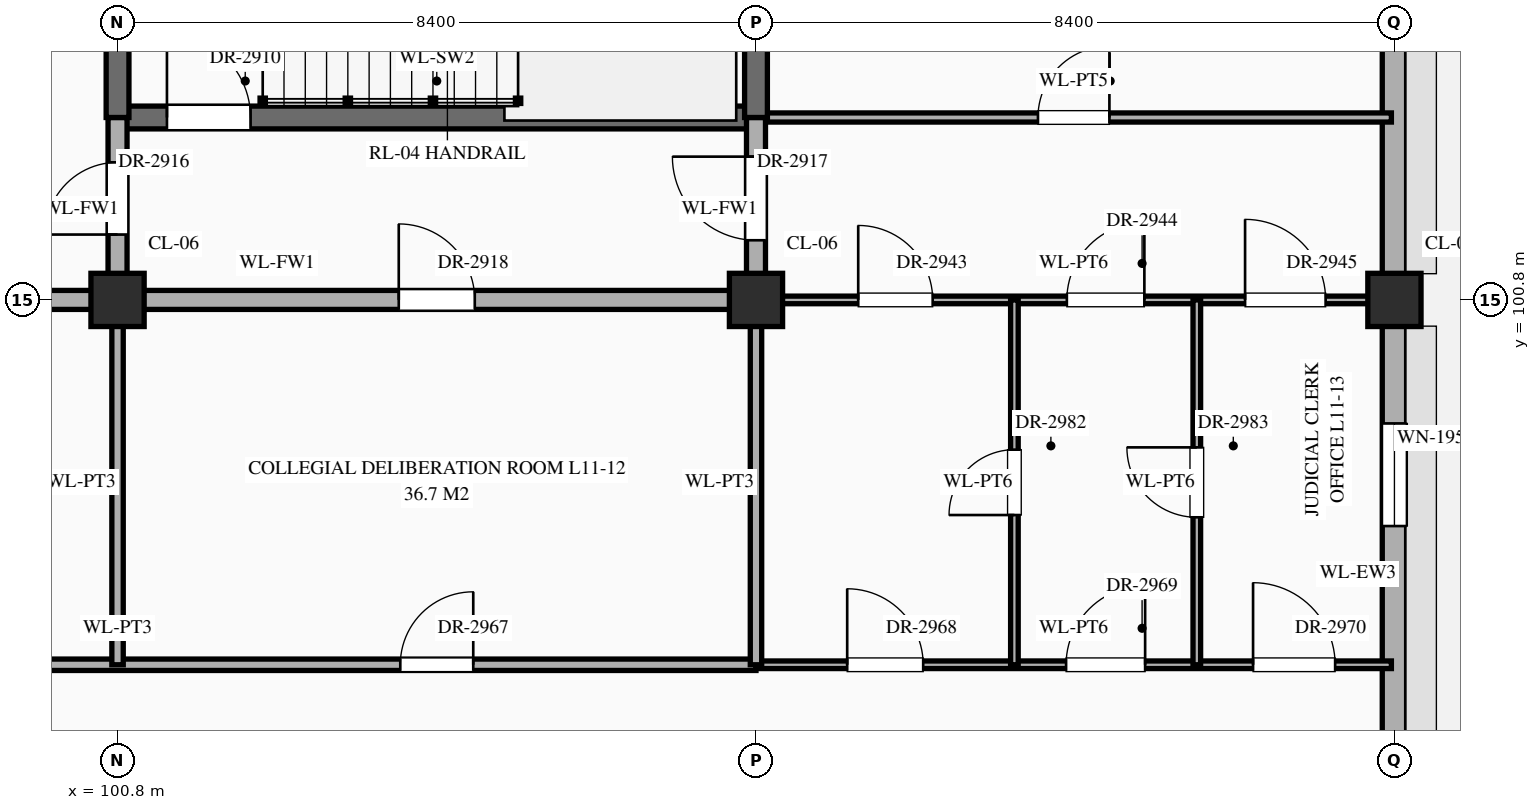
"""IFC4 building model, lengths in metres.
Left out: names, types, materials, properties, quantities, classifications, styles, units other than length and angle.
Written with IfcOpenShell. Run it as: python <this file> out.ifc"""

import sys

from ifc_helpers import new_model, si_unit, direction, frame, frame_2d, origin, origin_2d, place, context, subcontext, project, spatial, rectangle, extrude, element, fill, save


model = new_model("IFC4")
c1 = context("Model", 3, precision=1e-05, world=origin(), true_north=direction((0.0, 1.0)))
c2 = subcontext(c1, "Body", "Model", "MODEL_VIEW")
j1 = project(units=[si_unit("LENGTHUNIT", "METRE"), si_unit("PLANEANGLEUNIT", "RADIAN")], contexts=[c1])
p1 = place(None, origin())
s1 = spatial("IfcSite", under=j1, at=p1, CompositionType="ELEMENT")
p2 = place(p1, origin())
s2 = spatial("IfcBuilding", under=s1, at=p2, CompositionType="ELEMENT")
p3 = place(p2, frame((0.0, 0.0, 47.7)))
s3 = spatial("IfcBuildingStorey", under=s2, at=p3, CompositionType="ELEMENT", Elevation=47.7)
for number, where, z_axis, x_axis in (
    (1, (100.8, 100.8, 0.0), (0.0, 0.0, 1.0), (1.0, 0.0, 0.0)),
    (2, (109.2, 100.8, 0.0), (0.0, 0.0, 1.0), (1.0, 0.0, 0.0)),
    (3, (117.6, 100.8, 0.0), (0.0, 0.0, 1.0), (1.0, 0.0, 0.0)),
):
    element("IfcColumn", number, at=place(p3, frame(where, z_axis=z_axis, x_axis=x_axis)), inside=s3, PredefinedType="COLUMN", context=c2, shape_type="SweptSolid", body=[
        extrude(rectangle(XDim=0.7, YDim=0.7, at=origin_2d()), origin(), (0.0, 0.0, 1.0), 4.2),
    ])
p4 = place(p3, frame((117.6, 93.945, 0.0), z_axis=(0.0, 0.0, 1.0), x_axis=(0.0, 1.0, 0.0)))
e4 = element("IfcWall", 4, at=p4, inside=s3, PredefinedType="STANDARD", context=c2, shape_type="SweptSolid", body=[
    extrude(rectangle(XDim=6.51, YDim=0.32, at=frame_2d((3.255, 0.0))), origin(), (0.0, 0.0, 1.0), 3.31),
])
p5 = place(p4, frame((3.88, 0.0, 0.55)))
e5 = element("IfcOpeningElement", 5, at=p5, cuts=e4, PredefinedType="OPENING", context=c2, shape_type="SweptSolid", body=[
    extrude(rectangle(XDim=1.35, YDim=1.92, at=frame_2d((0.675, 0.96))), frame((0.0, 0.172, 0.0), z_axis=(0.0, -1.0, 0.0), x_axis=(1.0, 0.0, 0.0)), (0.0, 0.0, 1.0), 0.344),
])
p6 = place(p3, frame((117.6, 101.145, 0.0), z_axis=(0.0, 0.0, 1.0), x_axis=(0.0, 1.0, 0.0)))
e6 = element("IfcWall", 6, at=p6, inside=s3, PredefinedType="STANDARD", context=c2, shape_type="SweptSolid", body=[
    extrude(rectangle(XDim=6.51, YDim=0.32, at=frame_2d((3.255, 0.0))), origin(), (0.0, 0.0, 1.0), 3.31),
])
p7 = place(p6, frame((3.88, 0.0, 0.55)))
e7 = element("IfcOpeningElement", 7, at=p7, cuts=e6, PredefinedType="OPENING", context=c2, shape_type="SweptSolid", body=[
    extrude(rectangle(XDim=1.35, YDim=2.12, at=frame_2d((0.675, 1.06))), frame((0.0, 0.172, 0.0), z_axis=(0.0, -1.0, 0.0), x_axis=(1.0, 0.0, 0.0)), (0.0, 0.0, 1.0), 0.344),
])
p8 = place(p3, frame((92.4, 96.0, 0.0), z_axis=(0.0, 0.0, 1.0), x_axis=(1.0, 0.0, 0.0)))
e8 = element("IfcWall", 8, at=p8, inside=s3, PredefinedType="STANDARD", context=c2, shape_type="SweptSolid", body=[
    extrude(rectangle(XDim=16.8, YDim=0.15, at=frame_2d((8.4, 0.0))), origin(), (0.0, 0.0, 1.0), 3.96),
])
p9 = place(p8, frame((3.74, 0.0, 0.0)))
e9 = element("IfcOpeningElement", 9, at=p9, cuts=e8, PredefinedType="OPENING", context=c2, shape_type="SweptSolid", body=[
    extrude(rectangle(XDim=0.92, YDim=2.15, at=frame_2d((0.46, 1.075))), frame((0.0, 0.087, 0.0), z_axis=(0.0, -1.0, 0.0), x_axis=(1.0, 0.0, 0.0)), (0.0, 0.0, 1.0), 0.174),
])
p10 = place(p8, frame((12.12, 0.0, 0.0)))
e10 = element("IfcOpeningElement", 10, at=p10, cuts=e8, PredefinedType="OPENING", context=c2, shape_type="SweptSolid", body=[
    extrude(rectangle(XDim=0.96, YDim=2.2, at=frame_2d((0.48, 1.1))), frame((0.0, 0.087, 0.0), z_axis=(0.0, -1.0, 0.0), x_axis=(1.0, 0.0, 0.0)), (0.0, 0.0, 1.0), 0.174),
])
p11 = place(p3, frame((109.2, 96.0, 0.0), z_axis=(0.0, 0.0, 1.0), x_axis=(1.0, 0.0, 0.0)))
e11 = element("IfcWall", 11, at=p11, inside=s3, PredefinedType="STANDARD", context=c2, shape_type="SweptSolid", body=[
    extrude(rectangle(XDim=8.36, YDim=0.1, at=frame_2d((4.18, 0.0))), origin(), (0.0, 0.0, 1.0), 3.96),
])
p12 = place(p11, frame((1.2, 0.0, 0.0)))
e12 = element("IfcOpeningElement", 12, at=p12, cuts=e11, PredefinedType="OPENING", context=c2, shape_type="SweptSolid", body=[
    extrude(rectangle(XDim=1.0, YDim=2.25, at=frame_2d((0.5, 1.125))), frame((0.0, 0.062, 0.0), z_axis=(0.0, -1.0, 0.0), x_axis=(1.0, 0.0, 0.0)), (0.0, 0.0, 1.0), 0.124),
])
p13 = place(p11, frame((4.08, 0.0, 0.0)))
e13 = element("IfcOpeningElement", 13, at=p13, cuts=e11, PredefinedType="OPENING", context=c2, shape_type="SweptSolid", body=[
    extrude(rectangle(XDim=1.04, YDim=2.2, at=frame_2d((0.52, 1.1))), frame((0.0, 0.062, 0.0), z_axis=(0.0, -1.0, 0.0), x_axis=(1.0, 0.0, 0.0)), (0.0, 0.0, 1.0), 0.124),
])
p14 = place(p11, frame((6.54, 0.0, 0.0)))
e14 = element("IfcOpeningElement", 14, at=p14, cuts=e11, PredefinedType="OPENING", context=c2, shape_type="SweptSolid", body=[
    extrude(rectangle(XDim=1.08, YDim=2.25, at=frame_2d((0.54, 1.125))), frame((0.0, 0.062, 0.0), z_axis=(0.0, -1.0, 0.0), x_axis=(1.0, 0.0, 0.0)), (0.0, 0.0, 1.0), 0.124),
])
p15 = place(p3, frame((96.6, 100.8, 0.0), z_axis=(0.0, 0.0, 1.0), x_axis=(1.0, 0.0, 0.0)))
e15 = element("IfcWall", 15, at=p15, inside=s3, PredefinedType="STANDARD", context=c2, shape_type="SweptSolid", body=[
    extrude(rectangle(XDim=12.6, YDim=0.25, at=frame_2d((6.3, 0.0))), origin(), (0.0, 0.0, 1.0), 3.11),
])
p16 = place(p15, frame((7.9, 0.0, 0.0)))
e16 = element("IfcOpeningElement", 16, at=p16, cuts=e15, PredefinedType="OPENING", context=c2, shape_type="SweptSolid", body=[
    extrude(rectangle(XDim=1.0, YDim=2.2, at=frame_2d((0.5, 1.1))), frame((0.0, 0.137, 0.0), z_axis=(0.0, -1.0, 0.0), x_axis=(1.0, 0.0, 0.0)), (0.0, 0.0, 1.0), 0.274),
])
p17 = place(p3, frame((109.2, 100.8, 0.0), z_axis=(0.0, 0.0, 1.0), x_axis=(1.0, 0.0, 0.0)))
e17 = element("IfcWall", 17, at=p17, inside=s3, PredefinedType="STANDARD", context=c2, shape_type="SweptSolid", body=[
    extrude(rectangle(XDim=8.36, YDim=0.1, at=frame_2d((4.18, 0.0))), origin(), (0.0, 0.0, 1.0), 3.11),
])
p18 = place(p17, frame((1.345, 0.0, 0.0)))
e18 = element("IfcOpeningElement", 18, at=p18, cuts=e17, PredefinedType="OPENING", context=c2, shape_type="SweptSolid", body=[
    extrude(rectangle(XDim=0.98, YDim=2.35, at=frame_2d((0.49, 1.175))), frame((0.0, 0.062, 0.0), z_axis=(0.0, -1.0, 0.0), x_axis=(1.0, 0.0, 0.0)), (0.0, 0.0, 1.0), 0.124),
])
p19 = place(p17, frame((4.09, 0.0, 0.0)))
e19 = element("IfcOpeningElement", 19, at=p19, cuts=e17, PredefinedType="OPENING", context=c2, shape_type="SweptSolid", body=[
    extrude(rectangle(XDim=1.02, YDim=2.4, at=frame_2d((0.51, 1.2))), frame((0.0, 0.062, 0.0), z_axis=(0.0, -1.0, 0.0), x_axis=(1.0, 0.0, 0.0)), (0.0, 0.0, 1.0), 0.124),
])
p20 = place(p17, frame((6.435, 0.0, 0.0)))
e20 = element("IfcOpeningElement", 20, at=p20, cuts=e17, PredefinedType="OPENING", context=c2, shape_type="SweptSolid", body=[
    extrude(rectangle(XDim=1.06, YDim=2.4, at=frame_2d((0.53, 1.2))), frame((0.0, 0.062, 0.0), z_axis=(0.0, -1.0, 0.0), x_axis=(1.0, 0.0, 0.0)), (0.0, 0.0, 1.0), 0.124),
])
p21 = place(p3, frame((100.8, 103.2, 0.0), z_axis=(0.0, 0.0, 1.0), x_axis=(1.0, 0.0, 0.0)))
e21 = element("IfcWall", 21, at=p21, inside=s3, PredefinedType="SHEAR", context=c2, shape_type="SweptSolid", body=[
    extrude(rectangle(XDim=8.4, YDim=0.3, at=frame_2d((4.2, 0.0))), origin(), (0.0, 0.0, 1.0), 3.96),
])
p22 = place(p21, frame((0.65, 0.0, 0.0)))
e22 = element("IfcOpeningElement", 22, at=p22, cuts=e21, PredefinedType="OPENING", context=c2, shape_type="SweptSolid", body=[
    extrude(rectangle(XDim=1.1, YDim=2.2, at=frame_2d((0.55, 1.1))), frame((0.0, 0.162, 0.0), z_axis=(0.0, -1.0, 0.0), x_axis=(1.0, 0.0, 0.0)), (0.0, 0.0, 1.0), 0.324),
])
p23 = place(p3, frame((109.2, 103.2, 0.0), z_axis=(0.0, 0.0, 1.0), x_axis=(1.0, 0.0, 0.0)))
e23 = element("IfcWall", 23, at=p23, inside=s3, PredefinedType="STANDARD", context=c2, shape_type="SweptSolid", body=[
    extrude(rectangle(XDim=8.36, YDim=0.12, at=frame_2d((4.18, 0.0))), origin(), (0.0, 0.0, 1.0), 3.96),
])
p24 = place(p23, frame((3.71, 0.0, 0.0)))
e24 = element("IfcOpeningElement", 24, at=p24, cuts=e23, PredefinedType="OPENING", context=c2, shape_type="SweptSolid", body=[
    extrude(rectangle(XDim=0.94, YDim=2.3, at=frame_2d((0.47, 1.15))), frame((0.0, 0.072, 0.0), z_axis=(0.0, -1.0, 0.0), x_axis=(1.0, 0.0, 0.0)), (0.0, 0.0, 1.0), 0.144),
])
p25 = place(p3, frame((100.8, 96.0, 0.0), z_axis=(0.0, 0.0, 1.0), x_axis=(0.0, 1.0, 0.0)))
e25 = element("IfcWall", 25, at=p25, inside=s3, PredefinedType="STANDARD", context=c2, shape_type="SweptSolid", body=[
    extrude(rectangle(XDim=4.8, YDim=0.15, at=frame_2d((2.4, 0.0))), origin(), (0.0, 0.0, 1.0), 3.21),
])
p26 = place(p3, frame((100.8, 100.8, 0.0), z_axis=(0.0, 0.0, 1.0), x_axis=(0.0, 1.0, 0.0)))
e26 = element("IfcWall", 26, at=p26, inside=s3, PredefinedType="STANDARD", context=c2, shape_type="SweptSolid", body=[
    extrude(rectangle(XDim=2.4, YDim=0.25, at=frame_2d((1.2, 0.0))), origin(), (0.0, 0.0, 1.0), 3.21),
])
p27 = place(p26, frame((0.86, 0.0, 0.0)))
e27 = element("IfcOpeningElement", 27, at=p27, cuts=e26, PredefinedType="OPENING", context=c2, shape_type="SweptSolid", body=[
    extrude(rectangle(XDim=0.95, YDim=2.15, at=frame_2d((0.475, 1.075))), frame((0.0, 0.137, 0.0), z_axis=(0.0, -1.0, 0.0), x_axis=(1.0, 0.0, 0.0)), (0.0, 0.0, 1.0), 0.274),
])
p28 = place(p3, frame((100.8, 103.2, 0.0), z_axis=(0.0, 0.0, 1.0), x_axis=(0.0, 1.0, 0.0)))
e28 = element("IfcWall", 28, at=p28, inside=s3, PredefinedType="SHEAR", context=c2, shape_type="SweptSolid", body=[
    extrude(rectangle(XDim=1.2, YDim=0.3, at=frame_2d((0.6, 0.0))), origin(), (0.0, 0.0, 1.0), 3.96),
])
p29 = place(p3, frame((109.2, 96.0, 0.0), z_axis=(0.0, 0.0, 1.0), x_axis=(0.0, 1.0, 0.0)))
e29 = element("IfcWall", 29, at=p29, inside=s3, PredefinedType="STANDARD", context=c2, shape_type="SweptSolid", body=[
    extrude(rectangle(XDim=4.8, YDim=0.15, at=frame_2d((2.4, 0.0))), origin(), (0.0, 0.0, 1.0), 3.21),
])
p30 = place(p3, frame((109.2, 100.8, 0.0), z_axis=(0.0, 0.0, 1.0), x_axis=(0.0, 1.0, 0.0)))
e30 = element("IfcWall", 30, at=p30, inside=s3, PredefinedType="STANDARD", context=c2, shape_type="SweptSolid", body=[
    extrude(rectangle(XDim=2.4, YDim=0.25, at=frame_2d((1.2, 0.0))), origin(), (0.0, 0.0, 1.0), 3.21),
])
p31 = place(p30, frame((0.785, 0.0, 0.0)))
e31 = element("IfcOpeningElement", 31, at=p31, cuts=e30, PredefinedType="OPENING", context=c2, shape_type="SweptSolid", body=[
    extrude(rectangle(XDim=1.1, YDim=2.2, at=frame_2d((0.55, 1.1))), frame((0.0, 0.137, 0.0), z_axis=(0.0, -1.0, 0.0), x_axis=(1.0, 0.0, 0.0)), (0.0, 0.0, 1.0), 0.274),
])
p32 = place(p3, frame((109.2, 103.2, 0.0), z_axis=(0.0, 0.0, 1.0), x_axis=(0.0, 1.0, 0.0)))
e32 = element("IfcWall", 32, at=p32, inside=s3, PredefinedType="SHEAR", context=c2, shape_type="SweptSolid", body=[
    extrude(rectangle(XDim=4.76, YDim=0.3, at=frame_2d((2.38, 0.0))), origin(), (0.0, 0.0, 1.0), 3.96),
])
p33 = place(p3, frame((112.6, 96.0, 0.0), z_axis=(0.0, 0.0, 1.0), x_axis=(0.0, 1.0, 0.0)))
e33 = element("IfcWall", 33, at=p33, inside=s3, PredefinedType="STANDARD", context=c2, shape_type="SweptSolid", body=[
    extrude(rectangle(XDim=4.8, YDim=0.1, at=frame_2d((2.4, 0.0))), origin(), (0.0, 0.0, 1.0), 3.96),
])
p34 = place(p33, frame((1.97, 0.0, 0.0)))
e34 = element("IfcOpeningElement", 34, at=p34, cuts=e33, PredefinedType="OPENING", context=c2, shape_type="SweptSolid", body=[
    extrude(rectangle(XDim=0.86, YDim=2.1, at=frame_2d((0.43, 1.05))), frame((0.0, 0.062, 0.0), z_axis=(0.0, -1.0, 0.0), x_axis=(1.0, 0.0, 0.0)), (0.0, 0.0, 1.0), 0.124),
])
p35 = place(p3, frame((115.0, 96.0, 0.0), z_axis=(0.0, 0.0, 1.0), x_axis=(0.0, 1.0, 0.0)))
e35 = element("IfcWall", 35, at=p35, inside=s3, PredefinedType="STANDARD", context=c2, shape_type="SweptSolid", body=[
    extrude(rectangle(XDim=4.8, YDim=0.1, at=frame_2d((2.4, 0.0))), origin(), (0.0, 0.0, 1.0), 3.96),
])
p36 = place(p35, frame((1.94, 0.0, 0.0)))
e36 = element("IfcOpeningElement", 36, at=p36, cuts=e35, PredefinedType="OPENING", context=c2, shape_type="SweptSolid", body=[
    extrude(rectangle(XDim=0.92, YDim=2.15, at=frame_2d((0.46, 1.075))), frame((0.0, 0.062, 0.0), z_axis=(0.0, -1.0, 0.0), x_axis=(1.0, 0.0, 0.0)), (0.0, 0.0, 1.0), 0.124),
])
p37 = place(p5, origin())
e37 = element("IfcWindow", 37, at=p37, inside=s3, PartitioningType="SINGLE_PANEL", PredefinedType="WINDOW", context=c2, shape_type="SweptSolid", body=[
    extrude(rectangle(XDim=1.35, YDim=1.92, at=frame_2d((0.675, 0.96))), frame((0.0, 0.03, 0.0), z_axis=(0.0, -1.0, 0.0), x_axis=(1.0, 0.0, 0.0)), (0.0, 0.0, 1.0), 0.06),
])
fill(e5, e37)
p38 = place(p22, origin())
e38 = element("IfcDoor", 38, at=p38, inside=s3, OperationType="SINGLE_SWING_LEFT", PredefinedType="DOOR", context=c2, shape_type="SweptSolid", body=[
    extrude(rectangle(XDim=1.1, YDim=2.2, at=frame_2d((0.55, 1.1))), frame((0.0, 0.025, 0.0), z_axis=(0.0, -1.0, 0.0), x_axis=(1.0, 0.0, 0.0)), (0.0, 0.0, 1.0), 0.05),
])
fill(e22, e38)
p39 = place(p27, origin())
e39 = element("IfcDoor", 39, at=p39, inside=s3, OperationType="SINGLE_SWING_LEFT", PredefinedType="DOOR", context=c2, shape_type="SweptSolid", body=[
    extrude(rectangle(XDim=0.95, YDim=2.15, at=frame_2d((0.475, 1.075))), frame((0.0, 0.025, 0.0), z_axis=(0.0, -1.0, 0.0), x_axis=(1.0, 0.0, 0.0)), (0.0, 0.0, 1.0), 0.05),
])
fill(e27, e39)
p40 = place(p31, origin())
e40 = element("IfcDoor", 40, at=p40, inside=s3, OperationType="SINGLE_SWING_RIGHT", PredefinedType="DOOR", context=c2, shape_type="SweptSolid", body=[
    extrude(rectangle(XDim=1.1, YDim=2.2, at=frame_2d((0.55, 1.1))), frame((0.0, 0.025, 0.0), z_axis=(0.0, -1.0, 0.0), x_axis=(1.0, 0.0, 0.0)), (0.0, 0.0, 1.0), 0.05),
])
fill(e31, e40)
p41 = place(p16, origin())
e41 = element("IfcDoor", 41, at=p41, inside=s3, OperationType="SINGLE_SWING_LEFT", PredefinedType="DOOR", context=c2, shape_type="SweptSolid", body=[
    extrude(rectangle(XDim=1.0, YDim=2.2, at=frame_2d((0.5, 1.1))), frame((0.0, 0.025, 0.0), z_axis=(0.0, -1.0, 0.0), x_axis=(1.0, 0.0, 0.0)), (0.0, 0.0, 1.0), 0.05),
])
fill(e16, e41)
p42 = place(p24, origin())
e42 = element("IfcDoor", 42, at=p42, inside=s3, OperationType="SINGLE_SWING_RIGHT", PredefinedType="DOOR", context=c2, shape_type="SweptSolid", body=[
    extrude(rectangle(XDim=0.94, YDim=2.3, at=frame_2d((0.47, 1.15))), frame((0.0, 0.025, 0.0), z_axis=(0.0, -1.0, 0.0), x_axis=(1.0, 0.0, 0.0)), (0.0, 0.0, 1.0), 0.05),
])
fill(e24, e42)
p43 = place(p18, origin())
e43 = element("IfcDoor", 43, at=p43, inside=s3, OperationType="SINGLE_SWING_LEFT", PredefinedType="DOOR", context=c2, shape_type="SweptSolid", body=[
    extrude(rectangle(XDim=0.98, YDim=2.35, at=frame_2d((0.49, 1.175))), frame((0.0, 0.025, 0.0), z_axis=(0.0, -1.0, 0.0), x_axis=(1.0, 0.0, 0.0)), (0.0, 0.0, 1.0), 0.05),
])
fill(e18, e43)
p44 = place(p19, origin())
e44 = element("IfcDoor", 44, at=p44, inside=s3, OperationType="SINGLE_SWING_RIGHT", PredefinedType="DOOR", context=c2, shape_type="SweptSolid", body=[
    extrude(rectangle(XDim=1.02, YDim=2.4, at=frame_2d((0.51, 1.2))), frame((0.0, 0.025, 0.0), z_axis=(0.0, -1.0, 0.0), x_axis=(1.0, 0.0, 0.0)), (0.0, 0.0, 1.0), 0.05),
])
fill(e19, e44)
p45 = place(p20, origin())
e45 = element("IfcDoor", 45, at=p45, inside=s3, OperationType="SINGLE_SWING_LEFT", PredefinedType="DOOR", context=c2, shape_type="SweptSolid", body=[
    extrude(rectangle(XDim=1.06, YDim=2.4, at=frame_2d((0.53, 1.2))), frame((0.0, 0.025, 0.0), z_axis=(0.0, -1.0, 0.0), x_axis=(1.0, 0.0, 0.0)), (0.0, 0.0, 1.0), 0.05),
])
fill(e20, e45)
p46 = place(p10, origin())
e46 = element("IfcDoor", 46, at=p46, inside=s3, OperationType="SINGLE_SWING_RIGHT", PredefinedType="DOOR", context=c2, shape_type="SweptSolid", body=[
    extrude(rectangle(XDim=0.96, YDim=2.2, at=frame_2d((0.48, 1.1))), frame((0.0, 0.025, 0.0), z_axis=(0.0, -1.0, 0.0), x_axis=(1.0, 0.0, 0.0)), (0.0, 0.0, 1.0), 0.05),
])
fill(e10, e46)
p47 = place(p12, origin())
e47 = element("IfcDoor", 47, at=p47, inside=s3, OperationType="SINGLE_SWING_LEFT", PredefinedType="DOOR", context=c2, shape_type="SweptSolid", body=[
    extrude(rectangle(XDim=1.0, YDim=2.25, at=frame_2d((0.5, 1.125))), frame((0.0, 0.025, 0.0), z_axis=(0.0, -1.0, 0.0), x_axis=(1.0, 0.0, 0.0)), (0.0, 0.0, 1.0), 0.05),
])
fill(e12, e47)
p48 = place(p13, origin())
e48 = element("IfcDoor", 48, at=p48, inside=s3, OperationType="SINGLE_SWING_RIGHT", PredefinedType="DOOR", context=c2, shape_type="SweptSolid", body=[
    extrude(rectangle(XDim=1.04, YDim=2.2, at=frame_2d((0.52, 1.1))), frame((0.0, 0.025, 0.0), z_axis=(0.0, -1.0, 0.0), x_axis=(1.0, 0.0, 0.0)), (0.0, 0.0, 1.0), 0.05),
])
fill(e13, e48)
p49 = place(p14, origin())
e49 = element("IfcDoor", 49, at=p49, inside=s3, OperationType="SINGLE_SWING_LEFT", PredefinedType="DOOR", context=c2, shape_type="SweptSolid", body=[
    extrude(rectangle(XDim=1.08, YDim=2.25, at=frame_2d((0.54, 1.125))), frame((0.0, 0.025, 0.0), z_axis=(0.0, -1.0, 0.0), x_axis=(1.0, 0.0, 0.0)), (0.0, 0.0, 1.0), 0.05),
])
fill(e14, e49)
p50 = place(p34, origin())
e50 = element("IfcDoor", 50, at=p50, inside=s3, OperationType="SINGLE_SWING_LEFT", PredefinedType="DOOR", context=c2, shape_type="SweptSolid", body=[
    extrude(rectangle(XDim=0.86, YDim=2.1, at=frame_2d((0.43, 1.05))), frame((0.0, 0.025, 0.0), z_axis=(0.0, -1.0, 0.0), x_axis=(1.0, 0.0, 0.0)), (0.0, 0.0, 1.0), 0.05),
])
fill(e34, e50)
p51 = place(p36, origin())
e51 = element("IfcDoor", 51, at=p51, inside=s3, OperationType="SINGLE_SWING_RIGHT", PredefinedType="DOOR", context=c2, shape_type="SweptSolid", body=[
    extrude(rectangle(XDim=0.92, YDim=2.15, at=frame_2d((0.46, 1.075))), frame((0.0, 0.025, 0.0), z_axis=(0.0, -1.0, 0.0), x_axis=(1.0, 0.0, 0.0)), (0.0, 0.0, 1.0), 0.05),
])
fill(e36, e51)
save(model, sys.argv[1])
